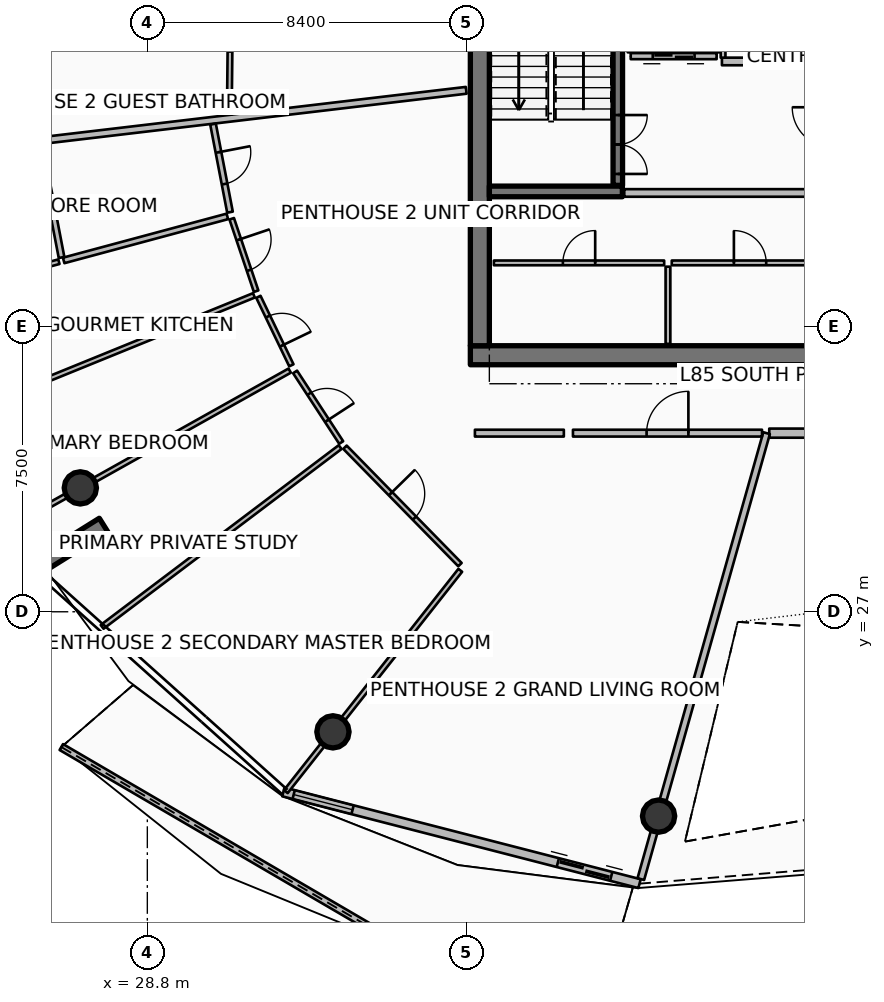
"""IFC4 building model, lengths in metres.
Left out: names, types, materials, properties, quantities, classifications, styles, units other than length and angle.
Written with IfcOpenShell. Run it as: python <this file> out.ifc"""

import sys

from ifc_helpers import new_model, si_unit, direction, frame, frame_2d, origin, origin_2d, place, context, subcontext, project, spatial, polyline, rectangle, circle, outline, extrude, element, fill, save


model = new_model("IFC4")
c1 = context("Model", 3, precision=1e-05, world=origin(), true_north=direction((0.0, 1.0)))
c2 = subcontext(c1, "Body", "Model", "MODEL_VIEW")
j1 = project(units=[si_unit("LENGTHUNIT", "METRE"), si_unit("PLANEANGLEUNIT", "RADIAN")], contexts=[c1])
p1 = place(None, origin())
s1 = spatial("IfcSite", under=j1, at=p1, CompositionType="ELEMENT")
p2 = place(p1, origin())
s2 = spatial("IfcBuilding", under=s1, at=p2, CompositionType="ELEMENT")
p3 = place(p2, frame((0.0, 0.0, 338.9)))
s3 = spatial("IfcBuildingStorey", under=s2, at=p3, CompositionType="ELEMENT", Elevation=338.9)
p4 = place(p3, frame((37.3, 33.75, 0.0), z_axis=(0.0, 0.0, 1.0), x_axis=(1.0, 0.0, 0.0)))
e1 = element("IfcWall", 1, at=p4, inside=s3, PredefinedType="SHEAR", context=c2, shape_type="SweptSolid", body=[
    extrude(rectangle(XDim=9.6, YDim=0.5, at=frame_2d((4.8, 0.0))), origin(), (0.0, 0.0, 1.0), 4.2),
])
p5 = place(p3, frame((37.55, 34.0, 0.0), z_axis=(0.0, 0.0, 1.0), x_axis=(0.0, 1.0, 0.0)))
e2 = element("IfcWall", 2, at=p5, inside=s3, PredefinedType="SHEAR", context=c2, shape_type="SweptSolid", body=[
    extrude(rectangle(XDim=16.0, YDim=0.5, at=frame_2d((8.0, 0.0))), origin(), (0.0, 0.0, 1.0), 4.2),
])
p6 = place(p3, frame((37.8, 38.06, 0.0), z_axis=(0.0, 0.0, 1.0), x_axis=(1.0, 0.0, 0.0)))
e3 = element("IfcWall", 3, at=p6, inside=s3, PredefinedType="SHEAR", context=c2, shape_type="SweptSolid", body=[
    extrude(rectangle(XDim=3.5, YDim=0.28, at=frame_2d((1.75, 0.0))), origin(), (0.0, 0.0, 1.0), 4.2),
])
p7 = place(p3, frame((27.647, 29.282, 0.0), z_axis=(0.0, 0.0, 1.0), x_axis=(-0.848053161125, -0.529911158502, 0.0)))
e4 = element("IfcWall", 4, at=p7, inside=s3, PredefinedType="SOLIDWALL", context=c2, shape_type="SweptSolid", body=[
    extrude(rectangle(XDim=3.5, YDim=0.42, at=frame_2d((1.75, 0.0))), origin(), (0.0, 0.0, 1.0), 4.2),
])
for number, where, z_axis, x_axis in (
    (5, (27.037, 30.26, 0.0), (0.0, 0.0, 1.0), (1.0, 0.0, 0.0)),
    (6, (33.684, 23.841, 0.0), (0.0, 0.0, 1.0), (1.0, 0.0, 0.0)),
    (7, (42.253, 21.624, 0.0), (0.0, 0.0, 1.0), (1.0, 0.0, 0.0)),
):
    element("IfcColumn", number, at=place(p3, frame(where, z_axis=z_axis, x_axis=x_axis)), inside=s3, PredefinedType="COLUMN", context=c2, shape_type="SweptSolid", body=[
        extrude(circle(Radius=0.425, at=origin_2d()), origin(), (0.0, 0.0, 1.0), 3.8),
    ])
p8 = place(p3, frame((26.537, 23.441, 0.0), z_axis=(0.0, 0.0, 1.0), x_axis=(0.863585787324, -0.504201931701, 0.0)))
e8 = element("IfcWall", 8, at=p8, inside=s3, PredefinedType="PARAPET", context=c2, shape_type="SweptSolid", body=[
    extrude(outline(polyline([(0.0, 0.0), (10.595, 0.0), (10.596, 1.832), (5.298, 1.853), (0.0, 1.756), (0.0, 0.0)])), frame((0.0, 0.09, 0.0), z_axis=(0.0, -1.0, 0.0), x_axis=(1.0, 0.0, 0.0)), (0.0, 0.0, 1.0), 0.18),
])
p9 = place(p3, frame((32.38, 22.26, 0.0), z_axis=(0.0, 0.0, 1.0), x_axis=(0.968389062354, -0.249444630957, 0.0)))
e9 = element("IfcWall", 9, at=p9, inside=s3, PredefinedType="SOLIDWALL", context=c2, shape_type="SweptSolid", body=[
    extrude(rectangle(XDim=9.678, YDim=0.24, at=frame_2d((4.839, 0.0))), origin(), (0.0, 0.0, 1.0), 2.75),
])
p10 = place(p9, frame((7.458, 0.0, 0.0)))
e10 = element("IfcOpeningElement", 10, at=p10, cuts=e9, PredefinedType="OPENING", context=c2, shape_type="SweptSolid", body=[
    extrude(rectangle(XDim=1.45, YDim=2.15, at=frame_2d((0.725, 1.075))), frame((0.0, 0.13, 0.0), z_axis=(0.0, -1.0, 0.0), x_axis=(1.0, 0.0, 0.0)), (0.0, 0.0, 1.0), 0.26),
])
p11 = place(p9, frame((0.28, 0.0, 0.65)))
e11 = element("IfcOpeningElement", 11, at=p11, cuts=e9, PredefinedType="OPENING", context=c2, shape_type="SweptSolid", body=[
    extrude(rectangle(XDim=1.6, YDim=1.5, at=frame_2d((0.8, 0.75))), frame((0.0, 0.13, 0.0), z_axis=(0.0, -1.0, 0.0), x_axis=(1.0, 0.0, 0.0)), (0.0, 0.0, 1.0), 0.26),
])
p12 = place(p3, frame((41.18, 38.22, 0.0), z_axis=(0.0, 0.0, 1.0), x_axis=(0.0, 1.0, 0.0)))
e12 = element("IfcWall", 12, at=p12, inside=s3, PredefinedType="SOLIDWALL", context=c2, shape_type="SweptSolid", body=[
    extrude(rectangle(XDim=7.56, YDim=0.25, at=frame_2d((3.78, 0.0))), origin(), (0.0, 0.0, 1.0), 3.8),
])
p13 = place(p12, frame((0.3, 0.0, 0.0)))
e13 = element("IfcOpeningElement", 13, at=p13, cuts=e12, PredefinedType="OPENING", context=c2, shape_type="SweptSolid", body=[
    extrude(rectangle(XDim=1.55, YDim=2.15, at=frame_2d((0.775, 1.075))), frame((0.0, 0.135, 0.0), z_axis=(0.0, -1.0, 0.0), x_axis=(1.0, 0.0, 0.0)), (0.0, 0.0, 1.0), 0.27),
])
p14 = place(p3, frame((43.78, 41.62, 0.0), z_axis=(0.0, 0.0, 1.0), x_axis=(-1.0, 0.0, 0.0)))
e14 = element("IfcWall", 14, at=p14, inside=s3, PredefinedType="PARTITIONING", context=c2, shape_type="SweptSolid", body=[
    extrude(rectangle(XDim=2.26, YDim=0.16, at=frame_2d((1.13, 0.0))), origin(), (0.0, 0.0, 1.0), 3.8),
])
p15 = place(p14, frame((0.58, 0.0, 0.0)))
e15 = element("IfcOpeningElement", 15, at=p15, cuts=e14, PredefinedType="OPENING", context=c2, shape_type="SweptSolid", body=[
    extrude(rectangle(XDim=1.1, YDim=2.1, at=frame_2d((0.55, 1.05))), frame((0.0, 0.09, 0.0), z_axis=(0.0, -1.0, 0.0), x_axis=(1.0, 0.0, 0.0)), (0.0, 0.0, 1.0), 0.18),
])
for number, where, z_axis, x_axis in (
    (16, (43.78, 41.72, 0.0), (0.0, 0.0, 1.0), (0.0, 1.0, 0.0)),
    (17, (41.52, 41.72, 0.0), (0.0, 0.0, 1.0), (0.0, 1.0, 0.0)),
):
    element("IfcWall", number, at=place(p3, frame(where, z_axis=z_axis, x_axis=x_axis)), inside=s3, PredefinedType="PARTITIONING", context=c2, shape_type="SweptSolid", body=[
        extrude(rectangle(XDim=2.26, YDim=0.16, at=frame_2d((1.13, 0.0))), origin(), (0.0, 0.0, 1.0), 3.8),
    ])
p16 = place(p3, frame((42.5, 34.05, 0.0), z_axis=(0.0, 0.0, 1.0), x_axis=(0.0, 1.0, 0.0)))
e18 = element("IfcWall", 18, at=p16, inside=s3, PredefinedType="PARTITIONING", context=c2, shape_type="SweptSolid", body=[
    extrude(rectangle(XDim=2.03, YDim=0.125, at=frame_2d((1.015, 0.0))), origin(), (0.0, 0.0, 1.0), 3.24),
])
p17 = place(p3, frame((37.92, 36.18, 0.0), z_axis=(0.0, 0.0, 1.0), x_axis=(1.0, 0.0, 0.0)))
e19 = element("IfcWall", 19, at=p17, inside=s3, PredefinedType="PARTITIONING", context=c2, shape_type="SweptSolid", body=[
    extrude(rectangle(XDim=4.48, YDim=0.125, at=frame_2d((2.24, 0.0))), origin(), (0.0, 0.0, 1.0), 3.24),
])
p18 = place(p17, frame((1.815, 0.0, 0.0)))
e20 = element("IfcOpeningElement", 20, at=p18, cuts=e19, PredefinedType="OPENING", context=c2, shape_type="SweptSolid", body=[
    extrude(rectangle(XDim=0.85, YDim=2.06, at=frame_2d((0.425, 1.03))), frame((0.0, 0.073, 0.0), z_axis=(0.0, -1.0, 0.0), x_axis=(1.0, 0.0, 0.0)), (0.0, 0.0, 1.0), 0.145),
])
p19 = place(p3, frame((42.6, 36.18, 0.0), z_axis=(0.0, 0.0, 1.0), x_axis=(1.0, 0.0, 0.0)))
e21 = element("IfcWall", 21, at=p19, inside=s3, PredefinedType="PARTITIONING", context=c2, shape_type="SweptSolid", body=[
    extrude(rectangle(XDim=4.12, YDim=0.125, at=frame_2d((2.06, 0.0))), origin(), (0.0, 0.0, 1.0), 3.24),
])
p20 = place(p19, frame((1.635, 0.0, 0.0)))
e22 = element("IfcOpeningElement", 22, at=p20, cuts=e21, PredefinedType="OPENING", context=c2, shape_type="SweptSolid", body=[
    extrude(rectangle(XDim=0.85, YDim=2.06, at=frame_2d((0.425, 1.03))), frame((0.0, 0.073, 0.0), z_axis=(0.0, -1.0, 0.0), x_axis=(1.0, 0.0, 0.0)), (0.0, 0.0, 1.0), 0.145),
])
p21 = place(p3, frame((41.35, 38.02, 0.0), z_axis=(0.0, 0.0, 1.0), x_axis=(1.0, 0.0, 0.0)))
e23 = element("IfcWall", 23, at=p21, inside=s3, PredefinedType="PARTITIONING", context=c2, shape_type="SweptSolid", body=[
    extrude(rectangle(XDim=5.37, YDim=0.2, at=frame_2d((2.685, 0.0))), origin(), (0.0, 0.0, 1.0), 3.8),
])
p22 = place(p3, frame((43.92, 41.48, 0.0), z_axis=(0.0, 0.0, 1.0), x_axis=(1.0, 0.0, 0.0)))
e24 = element("IfcWall", 24, at=p22, inside=s3, PredefinedType="PARTITIONING", context=c2, shape_type="SweptSolid", body=[
    extrude(rectangle(XDim=2.8, YDim=0.2, at=frame_2d((1.4, 0.0))), origin(), (0.0, 0.0, 1.0), 3.8),
])
p23 = place(p3, frame((43.95, 41.58, 0.0), z_axis=(0.0, 0.0, 1.0), x_axis=(0.0, 1.0, 0.0)))
e25 = element("IfcWall", 25, at=p23, inside=s3, PredefinedType="PARTITIONING", context=c2, shape_type="SweptSolid", body=[
    extrude(rectangle(XDim=4.32, YDim=0.125, at=frame_2d((2.16, 0.0))), origin(), (0.0, 0.0, 1.0), 3.24),
])
p24 = place(p3, frame((45.165, 31.7, 0.0), z_axis=(0.0, 0.0, 1.0), x_axis=(1.0, 0.0, 0.0)))
e26 = element("IfcWall", 26, at=p24, inside=s3, PredefinedType="SOLIDWALL", context=c2, shape_type="SweptSolid", body=[
    extrude(rectangle(XDim=8.533, YDim=0.24, at=frame_2d((4.267, 0.0))), origin(), (0.0, 0.0, 1.0), 3.24),
])
p25 = place(p3, frame((37.191, 40.721, 0.0), z_axis=(0.0, 0.0, 1.0), x_axis=(-0.993068548333, -0.117536625409, 0.0)))
e27 = element("IfcWall", 27, at=p25, inside=s3, PredefinedType="PARTITIONING", context=c2, shape_type="SweptSolid", body=[
    extrude(rectangle(XDim=14.951, YDim=0.18, at=frame_2d((7.476, 0.0))), origin(), (0.0, 0.0, 1.0), 3.24),
])
p26 = place(p3, frame((45.095, 31.7, 0.0), z_axis=(0.0, 0.0, 1.0), x_axis=(-0.271453030279, -0.962451688321, 0.0)))
e28 = element("IfcWall", 28, at=p26, inside=s3, PredefinedType="PARTITIONING", context=c2, shape_type="SweptSolid", body=[
    extrude(rectangle(XDim=12.191, YDim=0.18, at=frame_2d((6.096, 0.0))), origin(), (0.0, 0.0, 1.0), 3.24),
])
p27 = place(p3, frame((31.002, 44.298, 0.0), z_axis=(0.0, 0.0, 1.0), x_axis=(-0.010598269554, -0.999943836764, 0.0)))
e29 = element("IfcWall", 29, at=p27, inside=s3, PredefinedType="PARTITIONING", context=c2, shape_type="SweptSolid", body=[
    extrude(rectangle(XDim=4.216, YDim=0.125, at=frame_2d((2.108, 0.0))), origin(), (0.0, 0.0, 1.0), 3.24),
])
p28 = place(p27, frame((1.658, 0.0, 0.0)))
e30 = element("IfcOpeningElement", 30, at=p28, cuts=e29, PredefinedType="OPENING", context=c2, shape_type="SweptSolid", body=[
    extrude(rectangle(XDim=0.9, YDim=2.08, at=frame_2d((0.45, 1.04))), frame((0.0, 0.073, 0.0), z_axis=(0.0, -1.0, 0.0), x_axis=(1.0, 0.0, 0.0)), (0.0, 0.0, 1.0), 0.145),
])
p29 = place(p3, frame((40.0, 31.7, 0.0), z_axis=(0.0, 0.0, 1.0), x_axis=(1.0, 0.0, 0.0)))
e31 = element("IfcWall", 31, at=p29, inside=s3, PredefinedType="PARTITIONING", context=c2, shape_type="SweptSolid", body=[
    extrude(rectangle(XDim=4.975, YDim=0.18, at=frame_2d((2.488, 0.0))), origin(), (0.0, 0.0, 1.0), 3.24),
])
p30 = place(p29, frame((1.938, 0.0, 0.0)))
e32 = element("IfcOpeningElement", 32, at=p30, cuts=e31, PredefinedType="OPENING", context=c2, shape_type="SweptSolid", body=[
    extrude(rectangle(XDim=1.1, YDim=2.1, at=frame_2d((0.55, 1.05))), frame((0.0, 0.1, 0.0), z_axis=(0.0, -1.0, 0.0), x_axis=(1.0, 0.0, 0.0)), (0.0, 0.0, 1.0), 0.2),
])
p31 = place(p3, frame((30.529, 39.832, 0.0), z_axis=(0.0, 0.0, 1.0), x_axis=(0.189108301743, -0.981956236404, 0.0)))
e33 = element("IfcWall", 33, at=p31, inside=s3, PredefinedType="PARTITIONING", context=c2, shape_type="SweptSolid", body=[
    extrude(rectangle(XDim=2.36, YDim=0.15, at=frame_2d((1.18, 0.0))), origin(), (0.0, 0.0, 1.0), 3.24),
])
p32 = place(p31, frame((0.755, 0.0, 0.0)))
e34 = element("IfcOpeningElement", 34, at=p32, cuts=e33, PredefinedType="OPENING", context=c2, shape_type="SweptSolid", body=[
    extrude(rectangle(XDim=0.85, YDim=2.06, at=frame_2d((0.425, 1.03))), frame((0.0, 0.085, 0.0), z_axis=(0.0, -1.0, 0.0), x_axis=(1.0, 0.0, 0.0)), (0.0, 0.0, 1.0), 0.17),
])
p33 = place(p3, frame((25.971, 39.292, 0.0), z_axis=(0.0, 0.0, 1.0), x_axis=(0.189140808358, -0.981949975617, 0.0)))
e35 = element("IfcWall", 35, at=p33, inside=s3, PredefinedType="PARTITIONING", context=c2, shape_type="SweptSolid", body=[
    extrude(rectangle(XDim=3.024, YDim=0.15, at=frame_2d((1.512, 0.0))), origin(), (0.0, 0.0, 1.0), 3.24),
])
p34 = place(p3, frame((30.906, 37.403, 0.0), z_axis=(0.0, 0.0, 1.0), x_axis=(-0.96569498994, -0.259679006477, 0.0)))
e36 = element("IfcWall", 36, at=p34, inside=s3, PredefinedType="PARTITIONING", context=c2, shape_type="SweptSolid", body=[
    extrude(rectangle(XDim=4.46, YDim=0.15, at=frame_2d((2.23, 0.0))), origin(), (0.0, 0.0, 1.0), 3.24),
])
p35 = place(p3, frame((26.473, 36.211, 0.0), z_axis=(0.0, 0.0, 1.0), x_axis=(-0.965686885268, -0.259709144278, 0.0)))
e37 = element("IfcWall", 37, at=p35, inside=s3, PredefinedType="PARTITIONING", context=c2, shape_type="SweptSolid", body=[
    extrude(rectangle(XDim=3.081, YDim=0.125, at=frame_2d((1.54, 0.0))), origin(), (0.0, 0.0, 1.0), 3.24),
])
p36 = place(p35, frame((1.115, 0.0, 0.0)))
e38 = element("IfcOpeningElement", 38, at=p36, cuts=e37, PredefinedType="OPENING", context=c2, shape_type="SweptSolid", body=[
    extrude(rectangle(XDim=0.85, YDim=2.06, at=frame_2d((0.425, 1.03))), frame((0.0, 0.073, 0.0), z_axis=(0.0, -1.0, 0.0), x_axis=(1.0, 0.0, 0.0)), (0.0, 0.0, 1.0), 0.145),
])
p37 = place(p3, frame((31.604, 35.325, 0.0), z_axis=(0.0, 0.0, 1.0), x_axis=(-0.926197317487, -0.377039161202, 0.0)))
e39 = element("IfcWall", 39, at=p37, inside=s3, PredefinedType="PARTITIONING", context=c2, shape_type="SweptSolid", body=[
    extrude(rectangle(XDim=7.704, YDim=0.125, at=frame_2d((3.852, 0.0))), origin(), (0.0, 0.0, 1.0), 3.24),
])
p38 = place(p3, frame((31.021, 37.341, 0.0), z_axis=(0.0, 0.0, 1.0), x_axis=(0.318958301795, -0.947768749071, 0.0)))
e40 = element("IfcWall", 40, at=p38, inside=s3, PredefinedType="PARTITIONING", context=c2, shape_type="SweptSolid", body=[
    extrude(rectangle(XDim=2.011, YDim=0.125, at=frame_2d((1.005, 0.0))), origin(), (0.0, 0.0, 1.0), 3.24),
])
p39 = place(p38, frame((0.58, 0.0, 0.0)))
e41 = element("IfcOpeningElement", 41, at=p39, cuts=e40, PredefinedType="OPENING", context=c2, shape_type="SweptSolid", body=[
    extrude(rectangle(XDim=0.85, YDim=2.06, at=frame_2d((0.425, 1.03))), frame((0.0, 0.073, 0.0), z_axis=(0.0, -1.0, 0.0), x_axis=(1.0, 0.0, 0.0)), (0.0, 0.0, 1.0), 0.145),
])
p40 = place(p3, frame((31.723, 35.287, 0.0), z_axis=(0.0, 0.0, 1.0), x_axis=(0.433639468752, -0.901086461523, 0.0)))
e42 = element("IfcWall", 42, at=p40, inside=s3, PredefinedType="PARTITIONING", context=c2, shape_type="SweptSolid", body=[
    extrude(rectangle(XDim=2.0, YDim=0.125, at=frame_2d((1.0, 0.0))), origin(), (0.0, 0.0, 1.0), 3.24),
])
p41 = place(p40, frame((0.575, 0.0, 0.0)))
e43 = element("IfcOpeningElement", 43, at=p41, cuts=e42, PredefinedType="OPENING", context=c2, shape_type="SweptSolid", body=[
    extrude(rectangle(XDim=0.85, YDim=2.06, at=frame_2d((0.425, 1.03))), frame((0.0, 0.073, 0.0), z_axis=(0.0, -1.0, 0.0), x_axis=(1.0, 0.0, 0.0)), (0.0, 0.0, 1.0), 0.145),
])
p42 = place(p3, frame((37.42, 31.7, 0.0), z_axis=(0.0, 0.0, 1.0), x_axis=(1.0, 0.0, 0.0)))
e44 = element("IfcWall", 44, at=p42, inside=s3, PredefinedType="PARTITIONING", context=c2, shape_type="SweptSolid", body=[
    extrude(rectangle(XDim=2.34, YDim=0.18, at=frame_2d((1.17, 0.0))), origin(), (0.0, 0.0, 1.0), 3.24),
])
p43 = place(p3, frame((32.546, 33.345, 0.0), z_axis=(0.0, 0.0, 1.0), x_axis=(-0.87250499099, -0.488605199212, 0.0)))
e45 = element("IfcWall", 45, at=p43, inside=s3, PredefinedType="PARTITIONING", context=c2, shape_type="SweptSolid", body=[
    extrude(rectangle(XDim=8.124, YDim=0.125, at=frame_2d((4.062, 0.0))), origin(), (0.0, 0.0, 1.0), 3.24),
])
p44 = place(p3, frame((37.035, 28.091, 0.0), z_axis=(0.0, 0.0, 1.0), x_axis=(-0.619085814128, -0.785323344072, 0.0)))
e46 = element("IfcWall", 46, at=p44, inside=s3, PredefinedType="PARTITIONING", context=c2, shape_type="SweptSolid", body=[
    extrude(rectangle(XDim=7.415, YDim=0.125, at=frame_2d((3.708, 0.0))), origin(), (0.0, 0.0, 1.0), 3.24),
])
p45 = place(p3, frame((33.873, 31.333, 0.0), z_axis=(0.0, 0.0, 1.0), x_axis=(-0.798020912915, -0.602629755779, 0.0)))
e47 = element("IfcWall", 47, at=p45, inside=s3, PredefinedType="PARTITIONING", context=c2, shape_type="SweptSolid", body=[
    extrude(rectangle(XDim=7.848, YDim=0.125, at=frame_2d((3.924, 0.0))), origin(), (0.0, 0.0, 1.0), 3.24),
])
p46 = place(p3, frame((32.688, 33.311, 0.0), z_axis=(0.0, 0.0, 1.0), x_axis=(0.546878647358, -0.837211887794, 0.0)))
e48 = element("IfcWall", 48, at=p46, inside=s3, PredefinedType="PARTITIONING", context=c2, shape_type="SweptSolid", body=[
    extrude(rectangle(XDim=2.218, YDim=0.125, at=frame_2d((1.109, 0.0))), origin(), (0.0, 0.0, 1.0), 3.24),
])
p47 = place(p46, frame((0.684, 0.0, 0.0)))
e49 = element("IfcOpeningElement", 49, at=p47, cuts=e48, PredefinedType="OPENING", context=c2, shape_type="SweptSolid", body=[
    extrude(rectangle(XDim=0.85, YDim=2.06, at=frame_2d((0.425, 1.03))), frame((0.0, 0.073, 0.0), z_axis=(0.0, -1.0, 0.0), x_axis=(1.0, 0.0, 0.0)), (0.0, 0.0, 1.0), 0.145),
])
p48 = place(p3, frame((34.001, 31.33, 0.0), z_axis=(0.0, 0.0, 1.0), x_axis=(0.699699856998, -0.714436918221, 0.0)))
e50 = element("IfcWall", 50, at=p48, inside=s3, PredefinedType="PARTITIONING", context=c2, shape_type="SweptSolid", body=[
    extrude(rectangle(XDim=4.324, YDim=0.125, at=frame_2d((2.162, 0.0))), origin(), (0.0, 0.0, 1.0), 3.24),
])
p49 = place(p48, frame((1.712, 0.0, 0.0)))
e51 = element("IfcOpeningElement", 51, at=p49, cuts=e50, PredefinedType="OPENING", context=c2, shape_type="SweptSolid", body=[
    extrude(rectangle(XDim=0.9, YDim=2.08, at=frame_2d((0.45, 1.04))), frame((0.0, 0.073, 0.0), z_axis=(0.0, -1.0, 0.0), x_axis=(1.0, 0.0, 0.0)), (0.0, 0.0, 1.0), 0.145),
])
p50 = place(p10, origin())
e52 = element("IfcDoor", 52, at=p50, inside=s3, OperationType="DOUBLE_DOOR_SLIDING", PredefinedType="DOOR", context=c2, shape_type="SweptSolid", body=[
    extrude(rectangle(XDim=1.45, YDim=2.15, at=frame_2d((0.725, 1.075))), frame((0.0, 0.025, 0.0), z_axis=(0.0, -1.0, 0.0), x_axis=(1.0, 0.0, 0.0)), (0.0, 0.0, 1.0), 0.05),
])
fill(e10, e52)
p51 = place(p11, origin())
e53 = element("IfcWindow", 53, at=p51, inside=s3, PartitioningType="SINGLE_PANEL", PredefinedType="WINDOW", context=c2, shape_type="SweptSolid", body=[
    extrude(rectangle(XDim=1.6, YDim=1.5, at=frame_2d((0.8, 0.75))), frame((0.0, 0.03, 0.0), z_axis=(0.0, -1.0, 0.0), x_axis=(1.0, 0.0, 0.0)), (0.0, 0.0, 1.0), 0.06),
])
fill(e11, e53)
p52 = place(p13, origin())
e54 = element("IfcDoor", 54, at=p52, inside=s3, OperationType="DOUBLE_DOOR_SINGLE_SWING", PredefinedType="DOOR", context=c2, shape_type="SweptSolid", body=[
    extrude(rectangle(XDim=1.55, YDim=2.15, at=frame_2d((0.775, 1.075))), frame((0.0, 0.025, 0.0), z_axis=(0.0, -1.0, 0.0), x_axis=(1.0, 0.0, 0.0)), (0.0, 0.0, 1.0), 0.05),
])
fill(e13, e54)
p53 = place(p15, origin())
e55 = element("IfcDoor", 55, at=p53, inside=s3, OperationType="DOUBLE_DOOR_SLIDING", PredefinedType="DOOR", context=c2, shape_type="SweptSolid", body=[
    extrude(rectangle(XDim=1.1, YDim=2.1, at=frame_2d((0.55, 1.05))), frame((0.0, 0.025, 0.0), z_axis=(0.0, -1.0, 0.0), x_axis=(1.0, 0.0, 0.0)), (0.0, 0.0, 1.0), 0.05),
])
fill(e15, e55)
p54 = place(p18, origin())
e56 = element("IfcDoor", 56, at=p54, inside=s3, OperationType="SINGLE_SWING_RIGHT", PredefinedType="DOOR", context=c2, shape_type="SweptSolid", body=[
    extrude(rectangle(XDim=0.85, YDim=2.06, at=frame_2d((0.425, 1.03))), frame((0.0, 0.025, 0.0), z_axis=(0.0, -1.0, 0.0), x_axis=(1.0, 0.0, 0.0)), (0.0, 0.0, 1.0), 0.05),
])
fill(e20, e56)
p55 = place(p20, origin())
e57 = element("IfcDoor", 57, at=p55, inside=s3, OperationType="SINGLE_SWING_LEFT", PredefinedType="DOOR", context=c2, shape_type="SweptSolid", body=[
    extrude(rectangle(XDim=0.85, YDim=2.06, at=frame_2d((0.425, 1.03))), frame((0.0, 0.025, 0.0), z_axis=(0.0, -1.0, 0.0), x_axis=(1.0, 0.0, 0.0)), (0.0, 0.0, 1.0), 0.05),
])
fill(e22, e57)
p56 = place(p30, origin())
e58 = element("IfcDoor", 58, at=p56, inside=s3, OperationType="SINGLE_SWING_RIGHT", PredefinedType="DOOR", context=c2, shape_type="SweptSolid", body=[
    extrude(rectangle(XDim=1.1, YDim=2.1, at=frame_2d((0.55, 1.05))), frame((0.0, 0.025, 0.0), z_axis=(0.0, -1.0, 0.0), x_axis=(1.0, 0.0, 0.0)), (0.0, 0.0, 1.0), 0.05),
])
fill(e32, e58)
p57 = place(p32, origin())
e59 = element("IfcDoor", 59, at=p57, inside=s3, OperationType="SINGLE_SWING_LEFT", PredefinedType="DOOR", context=c2, shape_type="SweptSolid", body=[
    extrude(rectangle(XDim=0.85, YDim=2.06, at=frame_2d((0.425, 1.03))), frame((0.0, 0.025, 0.0), z_axis=(0.0, -1.0, 0.0), x_axis=(1.0, 0.0, 0.0)), (0.0, 0.0, 1.0), 0.05),
])
fill(e34, e59)
p58 = place(p39, origin())
e60 = element("IfcDoor", 60, at=p58, inside=s3, OperationType="SINGLE_SWING_LEFT", PredefinedType="DOOR", context=c2, shape_type="SweptSolid", body=[
    extrude(rectangle(XDim=0.85, YDim=2.06, at=frame_2d((0.425, 1.03))), frame((0.0, 0.025, 0.0), z_axis=(0.0, -1.0, 0.0), x_axis=(1.0, 0.0, 0.0)), (0.0, 0.0, 1.0), 0.05),
])
fill(e41, e60)
p59 = place(p41, origin())
e61 = element("IfcDoor", 61, at=p59, inside=s3, OperationType="SINGLE_SWING_RIGHT", PredefinedType="DOOR", context=c2, shape_type="SweptSolid", body=[
    extrude(rectangle(XDim=0.85, YDim=2.06, at=frame_2d((0.425, 1.03))), frame((0.0, 0.025, 0.0), z_axis=(0.0, -1.0, 0.0), x_axis=(1.0, 0.0, 0.0)), (0.0, 0.0, 1.0), 0.05),
])
fill(e43, e61)
p60 = place(p47, origin())
e62 = element("IfcDoor", 62, at=p60, inside=s3, OperationType="SINGLE_SWING_RIGHT", PredefinedType="DOOR", context=c2, shape_type="SweptSolid", body=[
    extrude(rectangle(XDim=0.85, YDim=2.06, at=frame_2d((0.425, 1.03))), frame((0.0, 0.025, 0.0), z_axis=(0.0, -1.0, 0.0), x_axis=(1.0, 0.0, 0.0)), (0.0, 0.0, 1.0), 0.05),
])
fill(e49, e62)
p61 = place(p49, origin())
e63 = element("IfcDoor", 63, at=p61, inside=s3, OperationType="SINGLE_SWING_LEFT", PredefinedType="DOOR", context=c2, shape_type="SweptSolid", body=[
    extrude(rectangle(XDim=0.9, YDim=2.08, at=frame_2d((0.45, 1.04))), frame((0.0, 0.025, 0.0), z_axis=(0.0, -1.0, 0.0), x_axis=(1.0, 0.0, 0.0)), (0.0, 0.0, 1.0), 0.05),
])
fill(e51, e63)
save(model, sys.argv[1])
